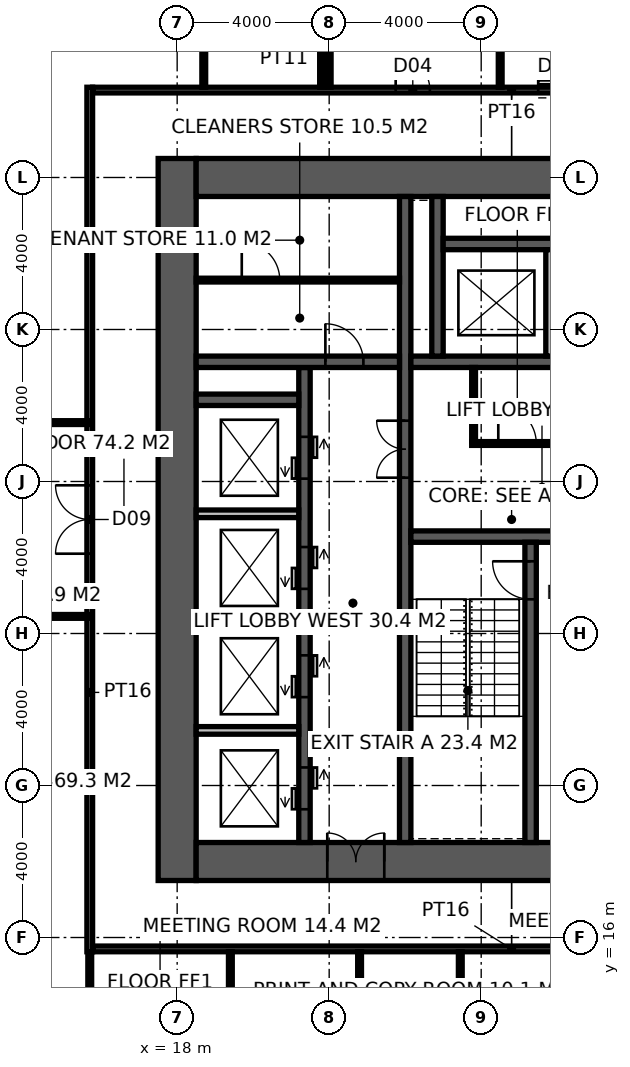
"""IFC4 building model, lengths in metres.
Left out: names, types, materials, properties, quantities, classifications, styles, units other than length and angle.
Written with IfcOpenShell. Run it as: python <this file> out.ifc"""

import sys

from ifc_helpers import new_model, si_unit, direction, frame, frame_2d, origin, place, context, subcontext, project, spatial, rectangle, extrude, element, fill, save


model = new_model("IFC4")
c1 = context("Model", 3, precision=1e-05, world=origin(), true_north=direction((0.0, 1.0)))
c2 = subcontext(c1, "Body", "Model", "MODEL_VIEW")
j1 = project(units=[si_unit("LENGTHUNIT", "METRE"), si_unit("PLANEANGLEUNIT", "RADIAN")], contexts=[c1])
p1 = place(None, origin())
s1 = spatial("IfcSite", under=j1, at=p1, CompositionType="ELEMENT")
p2 = place(p1, origin())
s2 = spatial("IfcBuilding", under=s1, at=p2, CompositionType="ELEMENT")
p3 = place(p2, frame((0.0, 0.0, 101.4)))
s3 = spatial("IfcBuildingStorey", under=s2, at=p3, CompositionType="ELEMENT", Elevation=101.4)
p4 = place(p3, frame((18.0, 17.5, -0.15), z_axis=(0.0, 0.0, 1.0), x_axis=(0.0, 1.0, 0.0)))
e1 = element("IfcWall", 1, at=p4, inside=s3, PredefinedType="SHEAR", context=c2, shape_type="SweptSolid", body=[
    extrude(rectangle(XDim=19.0, YDim=1.0, at=frame_2d((9.5, 0.0))), origin(), (0.0, 0.0, 1.0), 4.0),
])
p5 = place(p3, frame((18.5, 18.0, -0.15), z_axis=(0.0, 0.0, 1.0), x_axis=(1.0, 0.0, 0.0)))
e2 = element("IfcWall", 2, at=p5, inside=s3, PredefinedType="SHEAR", context=c2, shape_type="SweptSolid", body=[
    extrude(rectangle(XDim=17.6, YDim=1.0, at=frame_2d((8.8, 0.0))), origin(), (0.0, 0.0, 1.0), 4.0),
])
p6 = place(p5, frame((3.45, 0.0, 0.15)))
e3 = element("IfcOpeningElement", 3, at=p6, cuts=e2, PredefinedType="OPENING", context=c2, shape_type="SweptSolid", body=[
    extrude(rectangle(XDim=1.5, YDim=2.4, at=frame_2d((0.75, 1.2))), frame((0.0, 0.51, 0.0), z_axis=(0.0, -1.0, 0.0), x_axis=(1.0, 0.0, 0.0)), (0.0, 0.0, 1.0), 1.02),
])
p7 = place(p3, frame((18.5, 36.0, -0.15), z_axis=(0.0, 0.0, 1.0), x_axis=(1.0, 0.0, 0.0)))
e4 = element("IfcWall", 4, at=p7, inside=s3, PredefinedType="SHEAR", context=c2, shape_type="SweptSolid", body=[
    extrude(rectangle(XDim=17.6, YDim=1.0, at=frame_2d((8.8, 0.0))), origin(), (0.0, 0.0, 1.0), 4.0),
])
p8 = place(p3, frame((24.0, 18.5, -0.15), z_axis=(0.0, 0.0, 1.0), x_axis=(0.0, 1.0, 0.0)))
e5 = element("IfcWall", 5, at=p8, inside=s3, PredefinedType="SHEAR", context=c2, shape_type="SweptSolid", body=[
    extrude(rectangle(XDim=17.0, YDim=0.3, at=frame_2d((8.5, 0.0))), origin(), (0.0, 0.0, 1.0), 4.0),
])
p9 = place(p8, frame((9.6, 0.0, 0.15)))
e6 = element("IfcOpeningElement", 6, at=p9, cuts=e5, PredefinedType="OPENING", context=c2, shape_type="SweptSolid", body=[
    extrude(rectangle(XDim=1.5, YDim=2.4, at=frame_2d((0.75, 1.2))), frame((0.0, 0.16, 0.0), z_axis=(0.0, -1.0, 0.0), x_axis=(1.0, 0.0, 0.0)), (0.0, 0.0, 1.0), 0.32),
])
p10 = place(p3, frame((24.15, 26.55, -0.15), z_axis=(0.0, 0.0, 1.0), x_axis=(1.0, 0.0, 0.0)))
e7 = element("IfcWall", 7, at=p10, inside=s3, PredefinedType="SHEAR", context=c2, shape_type="SweptSolid", body=[
    extrude(rectangle(XDim=11.25, YDim=0.3, at=frame_2d((5.625, 0.0))), origin(), (0.0, 0.0, 1.0), 4.0),
])
p11 = place(p10, frame((9.25, 0.0, 0.15)))
e8 = element("IfcOpeningElement", 8, at=p11, cuts=e7, PredefinedType="OPENING", context=c2, shape_type="SweptSolid", body=[
    extrude(rectangle(XDim=1.0, YDim=2.2, at=frame_2d((0.5, 1.1))), frame((0.0, 0.16, 0.0), z_axis=(0.0, -1.0, 0.0), x_axis=(1.0, 0.0, 0.0)), (0.0, 0.0, 1.0), 0.32),
])
p12 = place(p10, frame((4.9, 0.0, 0.15)))
e9 = element("IfcOpeningElement", 9, at=p12, cuts=e7, PredefinedType="OPENING", context=c2, shape_type="SweptSolid", body=[
    extrude(rectangle(XDim=1.5, YDim=2.4, at=frame_2d((0.75, 1.2))), frame((0.0, 0.16, 0.0), z_axis=(0.0, -1.0, 0.0), x_axis=(1.0, 0.0, 0.0)), (0.0, 0.0, 1.0), 0.32),
])
p13 = place(p3, frame((27.3, 18.5, -0.15), z_axis=(0.0, 0.0, 1.0), x_axis=(0.0, 1.0, 0.0)))
e10 = element("IfcWall", 10, at=p13, inside=s3, PredefinedType="SHEAR", context=c2, shape_type="SweptSolid", body=[
    extrude(rectangle(XDim=7.9, YDim=0.3, at=frame_2d((3.95, 0.0))), origin(), (0.0, 0.0, 1.0), 4.0),
])
p14 = place(p13, frame((6.4, 0.0, 0.15)))
e11 = element("IfcOpeningElement", 11, at=p14, cuts=e10, PredefinedType="OPENING", context=c2, shape_type="SweptSolid", body=[
    extrude(rectangle(XDim=1.0, YDim=2.2, at=frame_2d((0.5, 1.1))), frame((0.0, 0.16, 0.0), z_axis=(0.0, -1.0, 0.0), x_axis=(1.0, 0.0, 0.0)), (0.0, 0.0, 1.0), 0.32),
])
p15 = place(p3, frame((24.15, 31.15, -0.15), z_axis=(0.0, 0.0, 1.0), x_axis=(1.0, 0.0, 0.0)))
e12 = element("IfcWall", 12, at=p15, inside=s3, PredefinedType="SHEAR", context=c2, shape_type="SweptSolid", body=[
    extrude(rectangle(XDim=11.25, YDim=0.3, at=frame_2d((5.625, 0.0))), origin(), (0.0, 0.0, 1.0), 4.0),
])
p16 = place(p15, frame((7.25, 0.0, 0.15)))
e13 = element("IfcOpeningElement", 13, at=p16, cuts=e12, PredefinedType="OPENING", context=c2, shape_type="SweptSolid", body=[
    extrude(rectangle(XDim=1.4, YDim=2.4, at=frame_2d((0.7, 1.2))), frame((0.0, 0.16, 0.0), z_axis=(0.0, -1.0, 0.0), x_axis=(1.0, 0.0, 0.0)), (0.0, 0.0, 1.0), 0.32),
])
p17 = place(p3, frame((21.35, 18.5, -0.15), z_axis=(0.0, 0.0, 1.0), x_axis=(0.0, 1.0, 0.0)))
e14 = element("IfcWall", 14, at=p17, inside=s3, PredefinedType="SHEAR", context=c2, shape_type="SweptSolid", body=[
    extrude(rectangle(XDim=12.5, YDim=0.3, at=frame_2d((6.25, 0.0))), origin(), (0.0, 0.0, 1.0), 4.0),
])
p18 = place(p17, frame((0.875, 0.0, 0.15)))
e15 = element("IfcOpeningElement", 15, at=p18, cuts=e14, PredefinedType="OPENING", context=c2, shape_type="SweptSolid", body=[
    extrude(rectangle(XDim=1.1, YDim=2.2, at=frame_2d((0.55, 1.1))), frame((0.0, 0.16, 0.0), z_axis=(0.0, -1.0, 0.0), x_axis=(1.0, 0.0, 0.0)), (0.0, 0.0, 1.0), 0.32),
])
p19 = place(p17, frame((3.825, 0.0, 0.15)))
e16 = element("IfcOpeningElement", 16, at=p19, cuts=e14, PredefinedType="OPENING", context=c2, shape_type="SweptSolid", body=[
    extrude(rectangle(XDim=1.1, YDim=2.2, at=frame_2d((0.55, 1.1))), frame((0.0, 0.16, 0.0), z_axis=(0.0, -1.0, 0.0), x_axis=(1.0, 0.0, 0.0)), (0.0, 0.0, 1.0), 0.32),
])
p20 = place(p17, frame((6.675, 0.0, 0.15)))
e17 = element("IfcOpeningElement", 17, at=p20, cuts=e14, PredefinedType="OPENING", context=c2, shape_type="SweptSolid", body=[
    extrude(rectangle(XDim=1.1, YDim=2.2, at=frame_2d((0.55, 1.1))), frame((0.0, 0.16, 0.0), z_axis=(0.0, -1.0, 0.0), x_axis=(1.0, 0.0, 0.0)), (0.0, 0.0, 1.0), 0.32),
])
p21 = place(p17, frame((9.575, 0.0, 0.15)))
e18 = element("IfcOpeningElement", 18, at=p21, cuts=e14, PredefinedType="OPENING", context=c2, shape_type="SweptSolid", body=[
    extrude(rectangle(XDim=1.1, YDim=2.2, at=frame_2d((0.55, 1.1))), frame((0.0, 0.16, 0.0), z_axis=(0.0, -1.0, 0.0), x_axis=(1.0, 0.0, 0.0)), (0.0, 0.0, 1.0), 0.32),
])
p22 = place(p3, frame((18.5, 31.15, -0.15), z_axis=(0.0, 0.0, 1.0), x_axis=(1.0, 0.0, 0.0)))
e19 = element("IfcWall", 19, at=p22, inside=s3, PredefinedType="SHEAR", context=c2, shape_type="SweptSolid", body=[
    extrude(rectangle(XDim=5.35, YDim=0.3, at=frame_2d((2.675, 0.0))), origin(), (0.0, 0.0, 1.0), 4.0),
])
p23 = place(p22, frame((3.4, 0.0, 0.15)))
e20 = element("IfcOpeningElement", 20, at=p23, cuts=e19, PredefinedType="OPENING", context=c2, shape_type="SweptSolid", body=[
    extrude(rectangle(XDim=1.0, YDim=2.2, at=frame_2d((0.5, 1.1))), frame((0.0, 0.16, 0.0), z_axis=(0.0, -1.0, 0.0), x_axis=(1.0, 0.0, 0.0)), (0.0, 0.0, 1.0), 0.32),
])
p24 = place(p3, frame((18.5, 30.15, -0.15), z_axis=(0.0, 0.0, 1.0), x_axis=(1.0, 0.0, 0.0)))
e21 = element("IfcWall", 21, at=p24, inside=s3, PredefinedType="SHEAR", context=c2, shape_type="SweptSolid", body=[
    extrude(rectangle(XDim=2.7, YDim=0.3, at=frame_2d((1.35, 0.0))), origin(), (0.0, 0.0, 1.0), 4.0),
])
p25 = place(p3, frame((24.85, 31.3, -0.15), z_axis=(0.0, 0.0, 1.0), x_axis=(0.0, 1.0, 0.0)))
e22 = element("IfcWall", 22, at=p25, inside=s3, PredefinedType="SHEAR", context=c2, shape_type="SweptSolid", body=[
    extrude(rectangle(XDim=4.2, YDim=0.3, at=frame_2d((2.1, 0.0))), origin(), (0.0, 0.0, 1.0), 4.0),
])
p26 = place(p3, frame((25.0, 34.25, -0.15), z_axis=(0.0, 0.0, 1.0), x_axis=(1.0, 0.0, 0.0)))
e23 = element("IfcWall", 23, at=p26, inside=s3, PredefinedType="SHEAR", context=c2, shape_type="SweptSolid", body=[
    extrude(rectangle(XDim=8.6, YDim=0.3, at=frame_2d((4.3, 0.0))), origin(), (0.0, 0.0, 1.0), 4.0),
])
p27 = place(p3, frame((27.8, 31.3, -0.15), z_axis=(0.0, 0.0, 1.0), x_axis=(0.0, 1.0, 0.0)))
e24 = element("IfcWall", 24, at=p27, inside=s3, PredefinedType="SOLIDWALL", context=c2, shape_type="SweptSolid", body=[
    extrude(rectangle(XDim=2.8, YDim=0.2, at=frame_2d((1.4, 0.0))), origin(), (0.0, 0.0, 1.0), 4.0),
])
for number, where, z_axis, x_axis in (
    (25, (18.5, 21.45, -0.15), (0.0, 0.0, 1.0), (1.0, 0.0, 0.0)),
    (26, (18.5, 24.3, -0.15), (0.0, 0.0, 1.0), (1.0, 0.0, 0.0)),
    (27, (18.5, 27.15, -0.15), (0.0, 0.0, 1.0), (1.0, 0.0, 0.0)),
):
    element("IfcWall", number, at=place(p3, frame(where, z_axis=z_axis, x_axis=x_axis)), inside=s3, PredefinedType="SOLIDWALL", context=c2, shape_type="SweptSolid", body=[
        extrude(rectangle(XDim=2.7, YDim=0.2, at=frame_2d((1.35, 0.0))), origin(), (0.0, 0.0, 1.0), 4.0),
    ])
p28 = place(p3, frame((18.5, 33.3, 0.0), z_axis=(0.0, 0.0, 1.0), x_axis=(1.0, 0.0, 0.0)))
e28 = element("IfcWall", 28, at=p28, inside=s3, PredefinedType="PARTITIONING", context=c2, shape_type="SweptSolid", body=[
    extrude(rectangle(XDim=5.35, YDim=0.1, at=frame_2d((2.675, 0.0))), origin(), (0.0, 0.0, 1.0), 3.85),
])
p29 = place(p28, frame((1.2, 0.0, 0.0)))
e29 = element("IfcOpeningElement", 29, at=p29, cuts=e28, PredefinedType="OPENING", context=c2, shape_type="SweptSolid", body=[
    extrude(rectangle(XDim=1.0, YDim=2.2, at=frame_2d((0.5, 1.1))), frame((0.0, 0.06, 0.0), z_axis=(0.0, -1.0, 0.0), x_axis=(1.0, 0.0, 0.0)), (0.0, 0.0, 1.0), 0.12),
])
p30 = place(p3, frame((25.75, 29.0, 0.0), z_axis=(0.0, 0.0, 1.0), x_axis=(1.0, 0.0, 0.0)))
e30 = element("IfcWall", 30, at=p30, inside=s3, PredefinedType="PARTITIONING", context=c2, shape_type="SweptSolid", body=[
    extrude(rectangle(XDim=4.7, YDim=0.1, at=frame_2d((2.35, 0.0))), origin(), (0.0, 0.0, 1.0), 3.85),
])
p31 = place(p30, frame((0.7, 0.0, 0.0)))
e31 = element("IfcOpeningElement", 31, at=p31, cuts=e30, PredefinedType="OPENING", context=c2, shape_type="SweptSolid", body=[
    extrude(rectangle(XDim=1.0, YDim=2.2, at=frame_2d((0.5, 1.1))), frame((0.0, 0.06, 0.0), z_axis=(0.0, -1.0, 0.0), x_axis=(1.0, 0.0, 0.0)), (0.0, 0.0, 1.0), 0.12),
])
p32 = place(p30, frame((3.0, 0.0, 0.0)))
e32 = element("IfcOpeningElement", 32, at=p32, cuts=e30, PredefinedType="OPENING", context=c2, shape_type="SweptSolid", body=[
    extrude(rectangle(XDim=1.0, YDim=2.2, at=frame_2d((0.5, 1.1))), frame((0.0, 0.06, 0.0), z_axis=(0.0, -1.0, 0.0), x_axis=(1.0, 0.0, 0.0)), (0.0, 0.0, 1.0), 0.12),
])
p33 = place(p3, frame((25.8, 29.05, 0.0), z_axis=(0.0, 0.0, 1.0), x_axis=(0.0, 1.0, 0.0)))
e33 = element("IfcWall", 33, at=p33, inside=s3, PredefinedType="PARTITIONING", context=c2, shape_type="SweptSolid", body=[
    extrude(rectangle(XDim=1.95, YDim=0.1, at=frame_2d((0.975, 0.0))), origin(), (0.0, 0.0, 1.0), 3.85),
])
p34 = place(p3, frame((15.7, 15.625, 0.0), z_axis=(0.0, 0.0, 1.0), x_axis=(0.0, 1.0, 0.0)))
e34 = element("IfcWall", 34, at=p34, inside=s3, PredefinedType="PARTITIONING", context=c2, shape_type="SweptSolid", body=[
    extrude(rectangle(XDim=22.75, YDim=0.15, at=frame_2d((11.375, 0.0))), origin(), (0.0, 0.0, 1.0), 3.85),
])
p35 = place(p34, frame((10.475, 0.0, 0.0)))
e35 = element("IfcOpeningElement", 35, at=p35, cuts=e34, PredefinedType="OPENING", context=c2, shape_type="SweptSolid", body=[
    extrude(rectangle(XDim=1.8, YDim=2.4, at=frame_2d((0.9, 1.2))), frame((0.0, 0.085, 0.0), z_axis=(0.0, -1.0, 0.0), x_axis=(1.0, 0.0, 0.0)), (0.0, 0.0, 1.0), 0.17),
])
p36 = place(p3, frame((15.775, 15.7, 0.0), z_axis=(0.0, 0.0, 1.0), x_axis=(1.0, 0.0, 0.0)))
e36 = element("IfcWall", 36, at=p36, inside=s3, PredefinedType="PARTITIONING", context=c2, shape_type="SweptSolid", body=[
    extrude(rectangle(XDim=22.05, YDim=0.15, at=frame_2d((11.025, 0.0))), origin(), (0.0, 0.0, 1.0), 3.85),
])
p37 = place(p3, frame((15.775, 38.3, 0.0), z_axis=(0.0, 0.0, 1.0), x_axis=(1.0, 0.0, 0.0)))
e37 = element("IfcWall", 37, at=p37, inside=s3, PredefinedType="PARTITIONING", context=c2, shape_type="SweptSolid", body=[
    extrude(rectangle(XDim=22.05, YDim=0.15, at=frame_2d((11.025, 0.0))), origin(), (0.0, 0.0, 1.0), 3.85),
])
p38 = place(p37, frame((7.975, 0.0, 0.0)))
e38 = element("IfcOpeningElement", 38, at=p38, cuts=e37, PredefinedType="OPENING", context=c2, shape_type="SweptSolid", body=[
    extrude(rectangle(XDim=0.9, YDim=2.1, at=frame_2d((0.45, 1.05))), frame((0.0, 0.085, 0.0), z_axis=(0.0, -1.0, 0.0), x_axis=(1.0, 0.0, 0.0)), (0.0, 0.0, 1.0), 0.17),
])
p39 = place(p37, frame((11.725, 0.0, 0.0)))
e39 = element("IfcOpeningElement", 39, at=p39, cuts=e37, PredefinedType="OPENING", context=c2, shape_type="SweptSolid", body=[
    extrude(rectangle(XDim=1.0, YDim=2.1, at=frame_2d((0.5, 1.05))), frame((0.0, 0.085, 0.0), z_axis=(0.0, -1.0, 0.0), x_axis=(1.0, 0.0, 0.0)), (0.0, 0.0, 1.0), 0.17),
])
p40 = place(p37, frame((15.575, 0.0, 0.0)))
e40 = element("IfcOpeningElement", 40, at=p40, cuts=e37, PredefinedType="OPENING", context=c2, shape_type="SweptSolid", body=[
    extrude(rectangle(XDim=0.9, YDim=2.1, at=frame_2d((0.45, 1.05))), frame((0.0, 0.085, 0.0), z_axis=(0.0, -1.0, 0.0), x_axis=(1.0, 0.0, 0.0)), (0.0, 0.0, 1.0), 0.17),
])
p41 = place(p3, frame((22.0, 38.375, 0.0), z_axis=(0.0, 0.0, 1.0), x_axis=(0.0, 1.0, 0.0)))
e41 = element("IfcWall", 41, at=p41, inside=s3, PredefinedType="PARTITIONING", context=c2, shape_type="SweptSolid", body=[
    extrude(rectangle(XDim=3.675, YDim=0.1, at=frame_2d((1.837, 0.0))), origin(), (0.0, 0.0, 1.0), 2.65),
])
p42 = place(p3, frame((26.5, 38.375, 0.0), z_axis=(0.0, 0.0, 1.0), x_axis=(0.0, 1.0, 0.0)))
e42 = element("IfcWall", 42, at=p42, inside=s3, PredefinedType="PARTITIONING", context=c2, shape_type="SweptSolid", body=[
    extrude(rectangle(XDim=3.575, YDim=0.1, at=frame_2d((1.788, 0.0))), origin(), (0.0, 0.0, 1.0), 2.65),
])
p43 = place(p3, frame((15.7, 11.55, 0.0), z_axis=(0.0, 0.0, 1.0), x_axis=(0.0, 1.0, 0.0)))
e43 = element("IfcWall", 43, at=p43, inside=s3, PredefinedType="PARTITIONING", context=c2, shape_type="SweptSolid", body=[
    extrude(rectangle(XDim=4.075, YDim=0.1, at=frame_2d((2.038, 0.0))), origin(), (0.0, 0.0, 1.0), 3.85),
])
p44 = place(p3, frame((18.7, 38.375, 0.0), z_axis=(0.0, 0.0, 1.0), x_axis=(0.0, 1.0, 0.0)))
e44 = element("IfcWall", 44, at=p44, inside=s3, PredefinedType="PARTITIONING", context=c2, shape_type="SweptSolid", body=[
    extrude(rectangle(XDim=3.475, YDim=0.1, at=frame_2d((1.738, 0.0))), origin(), (0.0, 0.0, 1.0), 3.85),
])
p45 = place(p3, frame((19.4, 11.55, 0.0), z_axis=(0.0, 0.0, 1.0), x_axis=(0.0, 1.0, 0.0)))
e45 = element("IfcWall", 45, at=p45, inside=s3, PredefinedType="PARTITIONING", context=c2, shape_type="SweptSolid", body=[
    extrude(rectangle(XDim=4.075, YDim=0.1, at=frame_2d((2.038, 0.0))), origin(), (0.0, 0.0, 1.0), 3.85),
])
p46 = place(p3, frame((21.8, 38.375, 0.0), z_axis=(0.0, 0.0, 1.0), x_axis=(0.0, 1.0, 0.0)))
e46 = element("IfcWall", 46, at=p46, inside=s3, PredefinedType="PARTITIONING", context=c2, shape_type="SweptSolid", body=[
    extrude(rectangle(XDim=3.475, YDim=0.1, at=frame_2d((1.738, 0.0))), origin(), (0.0, 0.0, 1.0), 2.65),
])
p47 = place(p3, frame((22.8, 11.55, 0.0), z_axis=(0.0, 0.0, 1.0), x_axis=(0.0, 1.0, 0.0)))
e47 = element("IfcWall", 47, at=p47, inside=s3, PredefinedType="PARTITIONING", context=c2, shape_type="SweptSolid", body=[
    extrude(rectangle(XDim=4.075, YDim=0.1, at=frame_2d((2.038, 0.0))), origin(), (0.0, 0.0, 1.0), 3.85),
])
p48 = place(p3, frame((25.45, 11.55, 0.0), z_axis=(0.0, 0.0, 1.0), x_axis=(0.0, 1.0, 0.0)))
e48 = element("IfcWall", 48, at=p48, inside=s3, PredefinedType="PARTITIONING", context=c2, shape_type="SweptSolid", body=[
    extrude(rectangle(XDim=4.075, YDim=0.1, at=frame_2d((2.038, 0.0))), origin(), (0.0, 0.0, 1.0), 2.65),
])
p49 = place(p3, frame((15.7, 29.55, 0.0), z_axis=(0.0, 0.0, 1.0), x_axis=(-1.0, 0.0, 0.0)))
e49 = element("IfcWall", 49, at=p49, inside=s3, PredefinedType="PARTITIONING", context=c2, shape_type="SweptSolid", body=[
    extrude(rectangle(XDim=4.5, YDim=0.1, at=frame_2d((2.25, 0.0))), origin(), (0.0, 0.0, 1.0), 3.85),
])
p50 = place(p3, frame((11.2, 24.45, 0.0), z_axis=(0.0, 0.0, 1.0), x_axis=(1.0, 0.0, 0.0)))
e50 = element("IfcWall", 50, at=p50, inside=s3, PredefinedType="PARTITIONING", context=c2, shape_type="SweptSolid", body=[
    extrude(rectangle(XDim=4.5, YDim=0.1, at=frame_2d((2.25, 0.0))), origin(), (0.0, 0.0, 1.0), 2.65),
])
p51 = place(p14, origin())
e51 = element("IfcDoor", 51, at=p51, inside=s3, OperationType="SINGLE_SWING_RIGHT", PredefinedType="DOOR", context=c2, shape_type="SweptSolid", body=[
    extrude(rectangle(XDim=1.0, YDim=2.2, at=frame_2d((0.5, 1.1))), frame((0.0, 0.025, 0.0), z_axis=(0.0, -1.0, 0.0), x_axis=(1.0, 0.0, 0.0)), (0.0, 0.0, 1.0), 0.05),
])
fill(e11, e51)
p52 = place(p9, origin())
e52 = element("IfcDoor", 52, at=p52, inside=s3, OperationType="DOUBLE_DOOR_DOUBLE_SWING", PredefinedType="DOOR", context=c2, shape_type="SweptSolid", body=[
    extrude(rectangle(XDim=1.5, YDim=2.4, at=frame_2d((0.75, 1.2))), frame((0.0, 0.025, 0.0), z_axis=(0.0, -1.0, 0.0), x_axis=(1.0, 0.0, 0.0)), (0.0, 0.0, 1.0), 0.05),
])
fill(e6, e52)
p53 = place(p23, origin())
e53 = element("IfcDoor", 53, at=p53, inside=s3, OperationType="SINGLE_SWING_LEFT", PredefinedType="DOOR", context=c2, shape_type="SweptSolid", body=[
    extrude(rectangle(XDim=1.0, YDim=2.2, at=frame_2d((0.5, 1.1))), frame((0.0, 0.025, 0.0), z_axis=(0.0, -1.0, 0.0), x_axis=(1.0, 0.0, 0.0)), (0.0, 0.0, 1.0), 0.05),
])
fill(e20, e53)
p54 = place(p29, origin())
e54 = element("IfcDoor", 54, at=p54, inside=s3, OperationType="SINGLE_SWING_LEFT", PredefinedType="DOOR", context=c2, shape_type="SweptSolid", body=[
    extrude(rectangle(XDim=1.0, YDim=2.2, at=frame_2d((0.5, 1.1))), frame((0.0, 0.025, 0.0), z_axis=(0.0, -1.0, 0.0), x_axis=(1.0, 0.0, 0.0)), (0.0, 0.0, 1.0), 0.05),
])
fill(e29, e54)
p55 = place(p31, origin())
e55 = element("IfcDoor", 55, at=p55, inside=s3, OperationType="SINGLE_SWING_LEFT", PredefinedType="DOOR", context=c2, shape_type="SweptSolid", body=[
    extrude(rectangle(XDim=1.0, YDim=2.2, at=frame_2d((0.5, 1.1))), frame((0.0, 0.025, 0.0), z_axis=(0.0, -1.0, 0.0), x_axis=(1.0, 0.0, 0.0)), (0.0, 0.0, 1.0), 0.05),
])
fill(e31, e55)
p56 = place(p6, origin())
e56 = element("IfcDoor", 56, at=p56, inside=s3, OperationType="DOUBLE_DOOR_DOUBLE_SWING", PredefinedType="DOOR", context=c2, shape_type="SweptSolid", body=[
    extrude(rectangle(XDim=1.5, YDim=2.4, at=frame_2d((0.75, 1.2))), frame((0.0, 0.025, 0.0), z_axis=(0.0, -1.0, 0.0), x_axis=(1.0, 0.0, 0.0)), (0.0, 0.0, 1.0), 0.05),
])
fill(e3, e56)
p57 = place(p38, origin())
e57 = element("IfcDoor", 57, at=p57, inside=s3, OperationType="SINGLE_SWING_LEFT", PredefinedType="DOOR", context=c2, shape_type="SweptSolid", body=[
    extrude(rectangle(XDim=0.9, YDim=2.1, at=frame_2d((0.45, 1.05))), frame((0.0, 0.025, 0.0), z_axis=(0.0, -1.0, 0.0), x_axis=(1.0, 0.0, 0.0)), (0.0, 0.0, 1.0), 0.05),
])
fill(e38, e57)
p58 = place(p39, origin())
e58 = element("IfcDoor", 58, at=p58, inside=s3, OperationType="SLIDING_TO_LEFT", PredefinedType="DOOR", context=c2, shape_type="SweptSolid", body=[
    extrude(rectangle(XDim=1.0, YDim=2.1, at=frame_2d((0.5, 1.05))), frame((0.0, 0.025, 0.0), z_axis=(0.0, -1.0, 0.0), x_axis=(1.0, 0.0, 0.0)), (0.0, 0.0, 1.0), 0.05),
])
fill(e39, e58)
p59 = place(p35, origin())
e59 = element("IfcDoor", 59, at=p59, inside=s3, OperationType="DOUBLE_DOOR_DOUBLE_SWING", PredefinedType="DOOR", context=c2, shape_type="SweptSolid", body=[
    extrude(rectangle(XDim=1.8, YDim=2.4, at=frame_2d((0.9, 1.2))), frame((0.0, 0.025, 0.0), z_axis=(0.0, -1.0, 0.0), x_axis=(1.0, 0.0, 0.0)), (0.0, 0.0, 1.0), 0.05),
])
fill(e35, e59)
p60 = place(p18, origin())
e60 = element("IfcDoor", 60, at=p60, inside=s3, OperationType="DOUBLE_DOOR_SLIDING", PredefinedType="DOOR", context=c2, shape_type="SweptSolid", body=[
    extrude(rectangle(XDim=1.1, YDim=2.2, at=frame_2d((0.55, 1.1))), frame((0.0, 0.025, 0.0), z_axis=(0.0, -1.0, 0.0), x_axis=(1.0, 0.0, 0.0)), (0.0, 0.0, 1.0), 0.05),
])
fill(e15, e60)
p61 = place(p19, origin())
e61 = element("IfcDoor", 61, at=p61, inside=s3, OperationType="DOUBLE_DOOR_SLIDING", PredefinedType="DOOR", context=c2, shape_type="SweptSolid", body=[
    extrude(rectangle(XDim=1.1, YDim=2.2, at=frame_2d((0.55, 1.1))), frame((0.0, 0.025, 0.0), z_axis=(0.0, -1.0, 0.0), x_axis=(1.0, 0.0, 0.0)), (0.0, 0.0, 1.0), 0.05),
])
fill(e16, e61)
p62 = place(p20, origin())
e62 = element("IfcDoor", 62, at=p62, inside=s3, OperationType="DOUBLE_DOOR_SLIDING", PredefinedType="DOOR", context=c2, shape_type="SweptSolid", body=[
    extrude(rectangle(XDim=1.1, YDim=2.2, at=frame_2d((0.55, 1.1))), frame((0.0, 0.025, 0.0), z_axis=(0.0, -1.0, 0.0), x_axis=(1.0, 0.0, 0.0)), (0.0, 0.0, 1.0), 0.05),
])
fill(e17, e62)
p63 = place(p21, origin())
e63 = element("IfcDoor", 63, at=p63, inside=s3, OperationType="DOUBLE_DOOR_SLIDING", PredefinedType="DOOR", context=c2, shape_type="SweptSolid", body=[
    extrude(rectangle(XDim=1.1, YDim=2.2, at=frame_2d((0.55, 1.1))), frame((0.0, 0.025, 0.0), z_axis=(0.0, -1.0, 0.0), x_axis=(1.0, 0.0, 0.0)), (0.0, 0.0, 1.0), 0.05),
])
fill(e18, e63)
save(model, sys.argv[1])
